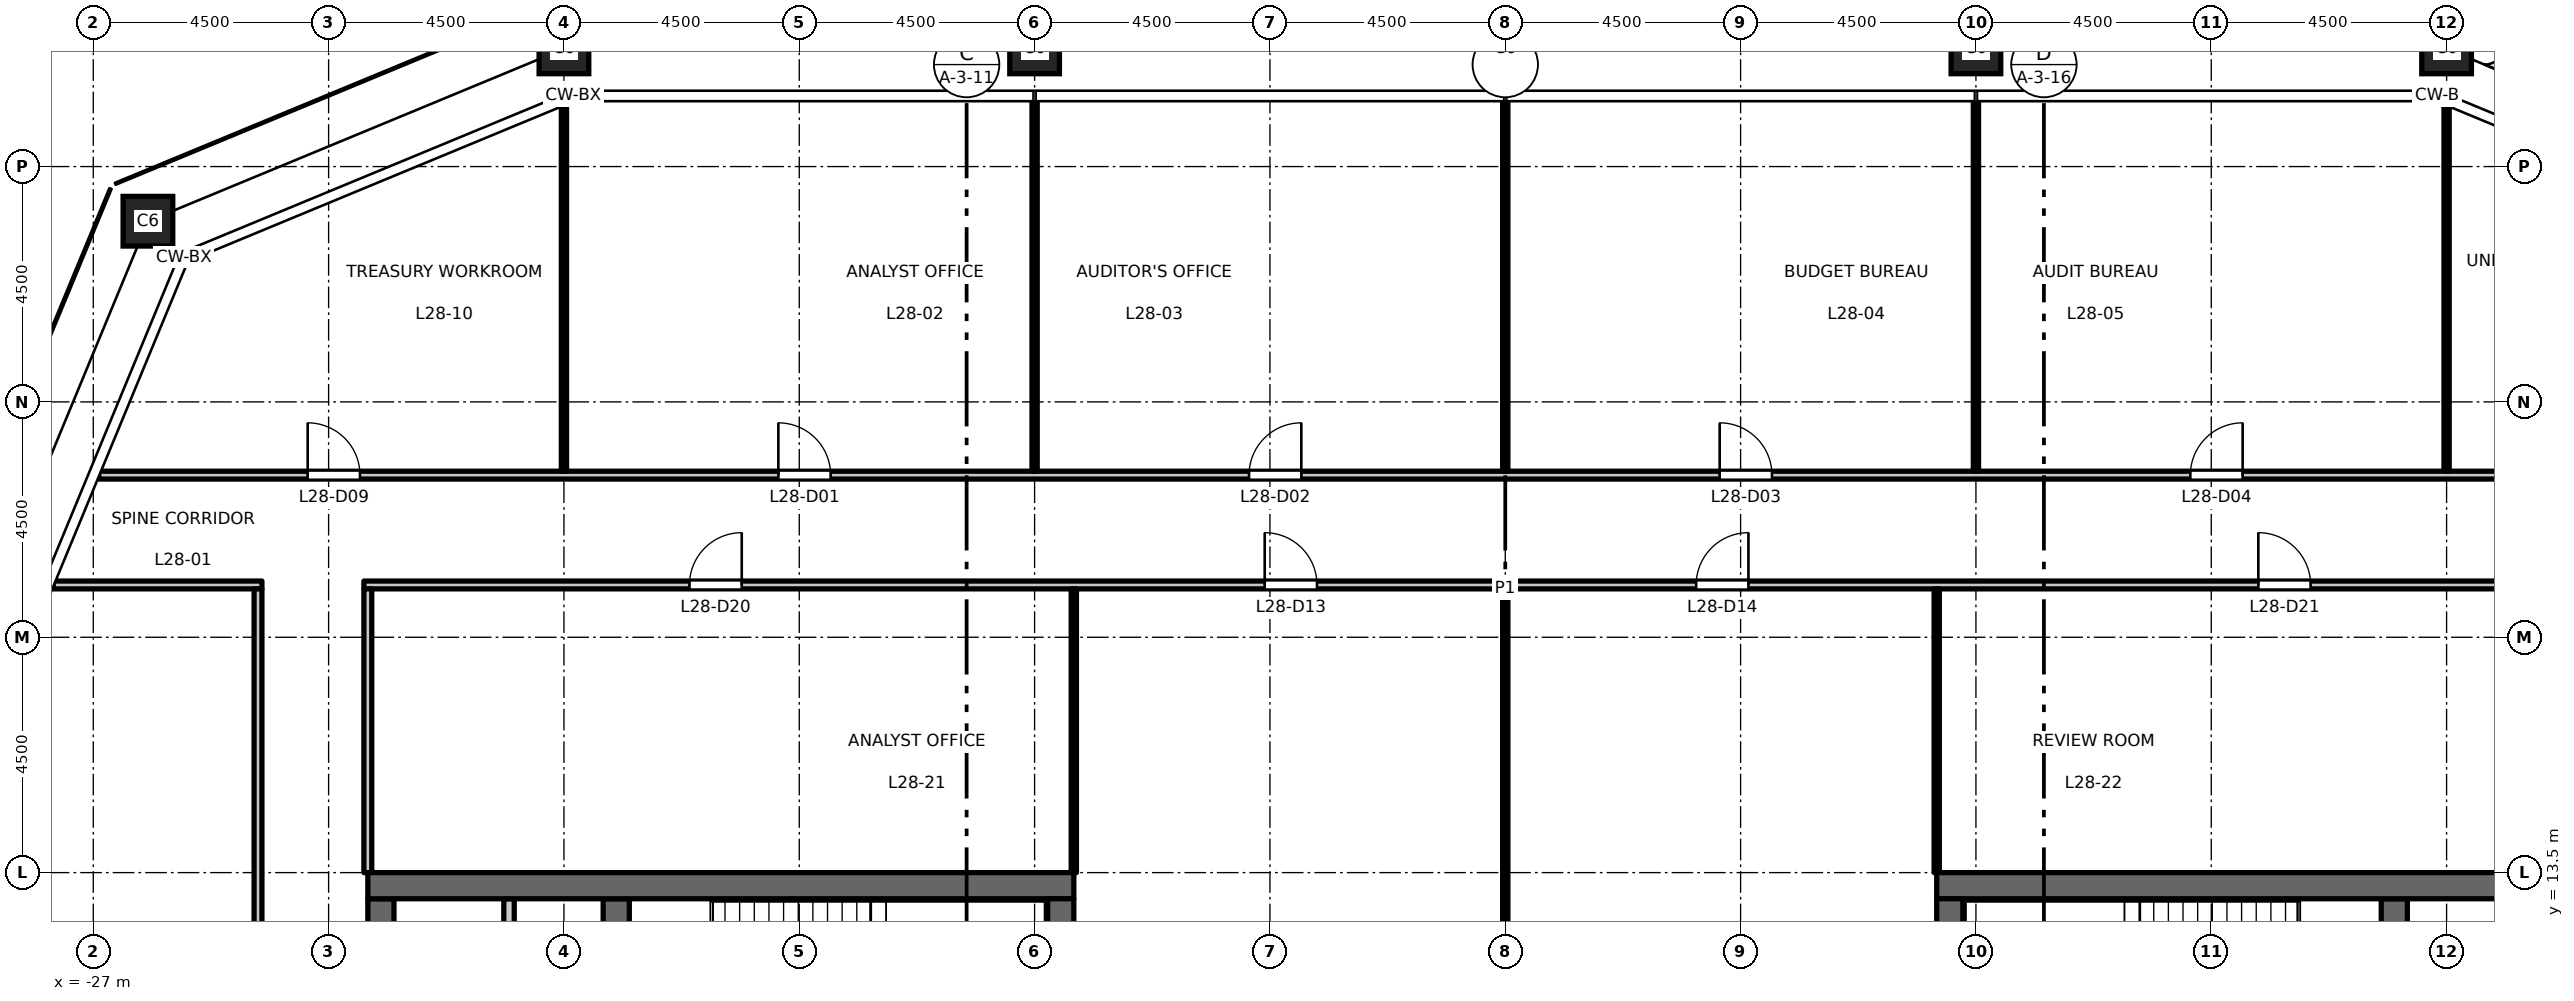
"""IFC4 building model, lengths in metres.
Left out: names, types, materials, properties, quantities, classifications, styles, units other than length and angle.
Written with IfcOpenShell. Run it as: python <this file> out.ifc"""

import sys

from ifc_helpers import new_model, si_unit, direction, frame, frame_2d, origin, origin_2d, place, context, subcontext, project, spatial, rectangle, hollow_rectangle, extrude, element, fill, save


model = new_model("IFC4")
c1 = context("Model", 3, precision=1e-05, world=origin(), true_north=direction((0.0, 1.0)))
c2 = subcontext(c1, "Body", "Model", "MODEL_VIEW")
j1 = project(units=[si_unit("LENGTHUNIT", "METRE"), si_unit("PLANEANGLEUNIT", "RADIAN")], contexts=[c1])
p1 = place(None, origin())
s1 = spatial("IfcSite", under=j1, at=p1, CompositionType="ELEMENT")
p2 = place(p1, origin())
s2 = spatial("IfcBuilding", under=s1, at=p2, CompositionType="ELEMENT")
p3 = place(p2, frame((0.0, 0.0, 131.7)))
s3 = spatial("IfcBuildingStorey", under=s2, at=p3, CompositionType="ELEMENT", Elevation=131.7)
for number, where, z_axis, x_axis in (
    (1, (18.0, 29.25, 0.0), (0.0, 0.0, 1.0), (1.0, 0.0, 0.0)),
    (2, (9.0, 29.25, 0.0), (0.0, 0.0, 1.0), (1.0, 0.0, 0.0)),
    (3, (0.0, 29.25, 0.0), (0.0, 0.0, 1.0), (1.0, 0.0, 0.0)),
    (4, (-9.0, 29.25, 0.0), (0.0, 0.0, 1.0), (1.0, 0.0, 0.0)),
    (5, (-18.0, 29.25, 0.0), (0.0, 0.0, 1.0), (1.0, 0.0, 0.0)),
    (6, (-25.955, 25.955, 0.0), (0.0, 0.0, 1.0), (1.0, 0.0, 0.0)),
):
    element("IfcColumn", number, at=place(p3, frame(where, z_axis=z_axis, x_axis=x_axis)), inside=s3, PredefinedType="COLUMN", context=c2, shape_type="SweptSolid", body=[
        extrude(hollow_rectangle(XDim=0.95, YDim=0.95, WallThickness=0.055, at=origin_2d()), origin(), (0.0, 0.0, 1.0), 4.5),
    ])
p4 = place(p3, frame((-21.5, -13.0, 0.0), z_axis=(0.0, 0.0, 1.0), x_axis=(0.0, 1.0, 0.0)))
e7 = element("IfcWall", 7, at=p4, inside=s3, PredefinedType="SHEAR", context=c2, shape_type="SweptSolid", body=[
    extrude(rectangle(XDim=26.0, YDim=0.5, at=frame_2d((13.0, 0.0))), origin(), (0.0, 0.0, 1.0), 4.35),
])
p5 = place(p4, frame((16.825, 0.0, 0.0)))
e8 = element("IfcOpeningElement", 8, at=p5, cuts=e7, PredefinedType="OPENING", context=c2, shape_type="SweptSolid", body=[
    extrude(rectangle(XDim=1.8, YDim=2.1, at=frame_2d((0.9, 1.05))), frame((0.0, 0.26, 0.0), z_axis=(0.0, -1.0, 0.0), x_axis=(1.0, 0.0, 0.0)), (0.0, 0.0, 1.0), 0.52),
])
p6 = place(p4, frame((7.375, 0.0, 0.0)))
e9 = element("IfcOpeningElement", 9, at=p6, cuts=e7, PredefinedType="OPENING", context=c2, shape_type="SweptSolid", body=[
    extrude(rectangle(XDim=1.8, YDim=2.1, at=frame_2d((0.9, 1.05))), frame((0.0, 0.26, 0.0), z_axis=(0.0, -1.0, 0.0), x_axis=(1.0, 0.0, 0.0)), (0.0, 0.0, 1.0), 0.52),
])
p7 = place(p3, frame((-19.05, 6.425, 0.0), z_axis=(0.0, 0.0, 1.0), x_axis=(0.0, 1.0, 0.0)))
e10 = element("IfcWall", 10, at=p7, inside=s3, PredefinedType="PARTITIONING", context=c2, shape_type="SweptSolid", body=[
    extrude(rectangle(XDim=6.575, YDim=0.2, at=frame_2d((3.288, 0.0))), origin(), (0.0, 0.0, 1.0), 4.35),
])
p8 = place(p3, frame((-17.0, 6.425, 0.0), z_axis=(0.0, 0.0, 1.0), x_axis=(0.0, 1.0, 0.0)))
e11 = element("IfcWall", 11, at=p8, inside=s3, PredefinedType="SHEAR", context=c2, shape_type="SweptSolid", body=[
    extrude(rectangle(XDim=6.575, YDim=0.5, at=frame_2d((3.288, 0.0))), origin(), (0.0, 0.0, 1.0), 4.35),
])
p9 = place(p3, frame((-8.25, 13.25, 0.0), z_axis=(0.0, 0.0, 1.0), x_axis=(-1.0, 0.0, 0.0)))
e12 = element("IfcWall", 12, at=p9, inside=s3, PredefinedType="SHEAR", context=c2, shape_type="SweptSolid", body=[
    extrude(rectangle(XDim=13.5, YDim=0.5, at=frame_2d((6.75, 0.0))), origin(), (0.0, 0.0, 1.0), 4.35),
])
p10 = place(p3, frame((-8.5, -13.0, 0.0), z_axis=(0.0, 0.0, 1.0), x_axis=(0.0, 1.0, 0.0)))
e13 = element("IfcWall", 13, at=p10, inside=s3, PredefinedType="SHEAR", context=c2, shape_type="SweptSolid", body=[
    extrude(rectangle(XDim=26.0, YDim=0.5, at=frame_2d((13.0, 0.0))), origin(), (0.0, 0.0, 1.0), 4.35),
])
p11 = place(p3, frame((17.0, 6.425, 0.0), z_axis=(0.0, 0.0, 1.0), x_axis=(0.0, 1.0, 0.0)))
e14 = element("IfcWall", 14, at=p11, inside=s3, PredefinedType="SHEAR", context=c2, shape_type="SweptSolid", body=[
    extrude(rectangle(XDim=6.575, YDim=0.5, at=frame_2d((3.288, 0.0))), origin(), (0.0, 0.0, 1.0), 4.35),
])
p12 = place(p3, frame((8.25, 13.25, 0.0), z_axis=(0.0, 0.0, 1.0), x_axis=(1.0, 0.0, 0.0)))
e15 = element("IfcWall", 15, at=p12, inside=s3, PredefinedType="SHEAR", context=c2, shape_type="SweptSolid", body=[
    extrude(rectangle(XDim=13.5, YDim=0.5, at=frame_2d((6.75, 0.0))), origin(), (0.0, 0.0, 1.0), 4.35),
])
p13 = place(p3, frame((8.5, -13.0, 0.0), z_axis=(0.0, 0.0, 1.0), x_axis=(0.0, 1.0, 0.0)))
e16 = element("IfcWall", 16, at=p13, inside=s3, PredefinedType="SHEAR", context=c2, shape_type="SweptSolid", body=[
    extrude(rectangle(XDim=26.0, YDim=0.5, at=frame_2d((13.0, 0.0))), origin(), (0.0, 0.0, 1.0), 4.35),
])
p14 = place(p3, frame((-27.764, 19.0, 0.0), z_axis=(0.0, 0.0, 1.0), x_axis=(1.0, 0.0, 0.0)))
e17 = element("IfcWall", 17, at=p14, inside=s3, PredefinedType="PARTITIONING", context=c2, shape_type="SweptSolid", body=[
    extrude(rectangle(XDim=3.989, YDim=0.15, at=frame_2d((1.995, 0.0))), origin(), (0.0, 0.0, 1.0), 4.35),
])
p15 = place(p3, frame((-21.825, 19.0, 0.0), z_axis=(0.0, 0.0, 1.0), x_axis=(1.0, 0.0, 0.0)))
e18 = element("IfcWall", 18, at=p15, inside=s3, PredefinedType="PARTITIONING", context=c2, shape_type="SweptSolid", body=[
    extrude(rectangle(XDim=43.65, YDim=0.15, at=frame_2d((21.825, 0.0))), origin(), (0.0, 0.0, 1.0), 4.35),
])
p16 = place(p15, frame((17.225, 0.0, 0.0)))
e19 = element("IfcOpeningElement", 19, at=p16, cuts=e18, PredefinedType="OPENING", context=c2, shape_type="SweptSolid", body=[
    extrude(rectangle(XDim=1.0, YDim=2.1, at=frame_2d((0.5, 1.05))), frame((0.0, 0.085, 0.0), z_axis=(0.0, -1.0, 0.0), x_axis=(1.0, 0.0, 0.0)), (0.0, 0.0, 1.0), 0.17),
])
p17 = place(p15, frame((25.475, 0.0, 0.0)))
e20 = element("IfcOpeningElement", 20, at=p17, cuts=e18, PredefinedType="OPENING", context=c2, shape_type="SweptSolid", body=[
    extrude(rectangle(XDim=1.0, YDim=2.1, at=frame_2d((0.5, 1.05))), frame((0.0, 0.085, 0.0), z_axis=(0.0, -1.0, 0.0), x_axis=(1.0, 0.0, 0.0)), (0.0, 0.0, 1.0), 0.17),
])
p18 = place(p15, frame((6.225, 0.0, 0.0)))
e21 = element("IfcOpeningElement", 21, at=p18, cuts=e18, PredefinedType="OPENING", context=c2, shape_type="SweptSolid", body=[
    extrude(rectangle(XDim=1.0, YDim=2.1, at=frame_2d((0.5, 1.05))), frame((0.0, 0.085, 0.0), z_axis=(0.0, -1.0, 0.0), x_axis=(1.0, 0.0, 0.0)), (0.0, 0.0, 1.0), 0.17),
])
p19 = place(p15, frame((36.225, 0.0, 0.0)))
e22 = element("IfcOpeningElement", 22, at=p19, cuts=e18, PredefinedType="OPENING", context=c2, shape_type="SweptSolid", body=[
    extrude(rectangle(XDim=1.0, YDim=2.1, at=frame_2d((0.5, 1.05))), frame((0.0, 0.085, 0.0), z_axis=(0.0, -1.0, 0.0), x_axis=(1.0, 0.0, 0.0)), (0.0, 0.0, 1.0), 0.17),
])
p20 = place(p3, frame((-26.894, 21.1, 0.0), z_axis=(0.0, 0.0, 1.0), x_axis=(1.0, 0.0, 0.0)))
e23 = element("IfcWall", 23, at=p20, inside=s3, PredefinedType="PARTITIONING", context=c2, shape_type="SweptSolid", body=[
    extrude(rectangle(XDim=53.788, YDim=0.15, at=frame_2d((26.894, 0.0))), origin(), (0.0, 0.0, 1.0), 4.35),
])
p21 = place(p20, frame((12.994, 0.0, 0.0)))
e24 = element("IfcOpeningElement", 24, at=p21, cuts=e23, PredefinedType="OPENING", context=c2, shape_type="SweptSolid", body=[
    extrude(rectangle(XDim=1.0, YDim=2.1, at=frame_2d((0.5, 1.05))), frame((0.0, 0.085, 0.0), z_axis=(0.0, -1.0, 0.0), x_axis=(1.0, 0.0, 0.0)), (0.0, 0.0, 1.0), 0.17),
])
p22 = place(p20, frame((21.994, 0.0, 0.0)))
e25 = element("IfcOpeningElement", 25, at=p22, cuts=e23, PredefinedType="OPENING", context=c2, shape_type="SweptSolid", body=[
    extrude(rectangle(XDim=1.0, YDim=2.1, at=frame_2d((0.5, 1.05))), frame((0.0, 0.085, 0.0), z_axis=(0.0, -1.0, 0.0), x_axis=(1.0, 0.0, 0.0)), (0.0, 0.0, 1.0), 0.17),
])
p23 = place(p20, frame((30.994, 0.0, 0.0)))
e26 = element("IfcOpeningElement", 26, at=p23, cuts=e23, PredefinedType="OPENING", context=c2, shape_type="SweptSolid", body=[
    extrude(rectangle(XDim=1.0, YDim=2.1, at=frame_2d((0.5, 1.05))), frame((0.0, 0.085, 0.0), z_axis=(0.0, -1.0, 0.0), x_axis=(1.0, 0.0, 0.0)), (0.0, 0.0, 1.0), 0.17),
])
p24 = place(p20, frame((39.994, 0.0, 0.0)))
e27 = element("IfcOpeningElement", 27, at=p24, cuts=e23, PredefinedType="OPENING", context=c2, shape_type="SweptSolid", body=[
    extrude(rectangle(XDim=1.0, YDim=2.1, at=frame_2d((0.5, 1.05))), frame((0.0, 0.085, 0.0), z_axis=(0.0, -1.0, 0.0), x_axis=(1.0, 0.0, 0.0)), (0.0, 0.0, 1.0), 0.17),
])
p25 = place(p20, frame((3.994, 0.0, 0.0)))
e28 = element("IfcOpeningElement", 28, at=p25, cuts=e23, PredefinedType="OPENING", context=c2, shape_type="SweptSolid", body=[
    extrude(rectangle(XDim=1.0, YDim=2.1, at=frame_2d((0.5, 1.05))), frame((0.0, 0.085, 0.0), z_axis=(0.0, -1.0, 0.0), x_axis=(1.0, 0.0, 0.0)), (0.0, 0.0, 1.0), 0.17),
])
p26 = place(p20, frame((48.888, 0.0, 0.0)))
e29 = element("IfcOpeningElement", 29, at=p26, cuts=e23, PredefinedType="OPENING", context=c2, shape_type="SweptSolid", body=[
    extrude(rectangle(XDim=1.0, YDim=2.1, at=frame_2d((0.5, 1.05))), frame((0.0, 0.085, 0.0), z_axis=(0.0, -1.0, 0.0), x_axis=(1.0, 0.0, 0.0)), (0.0, 0.0, 1.0), 0.17),
])
p27 = place(p3, frame((-23.85, -18.925, 0.0), z_axis=(0.0, 0.0, 1.0), x_axis=(0.0, 1.0, 0.0)))
e30 = element("IfcWall", 30, at=p27, inside=s3, PredefinedType="PARTITIONING", context=c2, shape_type="SweptSolid", body=[
    extrude(rectangle(XDim=37.85, YDim=0.15, at=frame_2d((18.925, 0.0))), origin(), (0.0, 0.0, 1.0), 4.35),
])
p28 = place(p27, frame((18.525, 0.0, 0.0)))
e31 = element("IfcOpeningElement", 31, at=p28, cuts=e30, PredefinedType="OPENING", context=c2, shape_type="SweptSolid", body=[
    extrude(rectangle(XDim=1.0, YDim=2.1, at=frame_2d((0.5, 1.05))), frame((0.0, 0.085, 0.0), z_axis=(0.0, -1.0, 0.0), x_axis=(1.0, 0.0, 0.0)), (0.0, 0.0, 1.0), 0.17),
])
p29 = place(p3, frame((-21.75, 13.5, 0.0), z_axis=(0.0, 0.0, 1.0), x_axis=(0.0, 1.0, 0.0)))
e32 = element("IfcWall", 32, at=p29, inside=s3, PredefinedType="PARTITIONING", context=c2, shape_type="SweptSolid", body=[
    extrude(rectangle(XDim=5.425, YDim=0.15, at=frame_2d((2.712, 0.0))), origin(), (0.0, 0.0, 1.0), 4.35),
])
p30 = place(p3, frame((-18.0, 21.175, 0.0), z_axis=(0.0, 0.0, 1.0), x_axis=(0.0, 1.0, 0.0)))
e33 = element("IfcWall", 33, at=p30, inside=s3, PredefinedType="PARTITIONING", context=c2, shape_type="SweptSolid", body=[
    extrude(rectangle(XDim=7.003, YDim=0.1, at=frame_2d((3.501, 0.0))), origin(), (0.0, 0.0, 1.0), 3.45),
])
p31 = place(p3, frame((-9.0, 21.175, 0.0), z_axis=(0.0, 0.0, 1.0), x_axis=(0.0, 1.0, 0.0)))
e34 = element("IfcWall", 34, at=p31, inside=s3, PredefinedType="PARTITIONING", context=c2, shape_type="SweptSolid", body=[
    extrude(rectangle(XDim=7.085, YDim=0.1, at=frame_2d((3.542, 0.0))), origin(), (0.0, 0.0, 1.0), 3.45),
])
p32 = place(p3, frame((-8.25, 13.5, 0.0), z_axis=(0.0, 0.0, 1.0), x_axis=(0.0, 1.0, 0.0)))
e35 = element("IfcWall", 35, at=p32, inside=s3, PredefinedType="PARTITIONING", context=c2, shape_type="SweptSolid", body=[
    extrude(rectangle(XDim=5.425, YDim=0.1, at=frame_2d((2.712, 0.0))), origin(), (0.0, 0.0, 1.0), 4.35),
])
p33 = place(p3, frame((0.0, 8.65, 0.0), z_axis=(0.0, 0.0, 1.0), x_axis=(0.0, 1.0, 0.0)))
e36 = element("IfcWall", 36, at=p33, inside=s3, PredefinedType="PARTITIONING", context=c2, shape_type="SweptSolid", body=[
    extrude(rectangle(XDim=10.275, YDim=0.1, at=frame_2d((5.138, 0.0))), origin(), (0.0, 0.0, 1.0), 3.45),
])
p34 = place(p3, frame((0.0, 21.175, 0.0), z_axis=(0.0, 0.0, 1.0), x_axis=(0.0, 1.0, 0.0)))
e37 = element("IfcWall", 37, at=p34, inside=s3, PredefinedType="PARTITIONING", context=c2, shape_type="SweptSolid", body=[
    extrude(rectangle(XDim=7.085, YDim=0.1, at=frame_2d((3.542, 0.0))), origin(), (0.0, 0.0, 1.0), 3.45),
])
p35 = place(p3, frame((8.25, 13.5, 0.0), z_axis=(0.0, 0.0, 1.0), x_axis=(0.0, 1.0, 0.0)))
e38 = element("IfcWall", 38, at=p35, inside=s3, PredefinedType="PARTITIONING", context=c2, shape_type="SweptSolid", body=[
    extrude(rectangle(XDim=5.425, YDim=0.1, at=frame_2d((2.712, 0.0))), origin(), (0.0, 0.0, 1.0), 4.35),
])
p36 = place(p3, frame((9.0, 21.175, 0.0), z_axis=(0.0, 0.0, 1.0), x_axis=(0.0, 1.0, 0.0)))
e39 = element("IfcWall", 39, at=p36, inside=s3, PredefinedType="PARTITIONING", context=c2, shape_type="SweptSolid", body=[
    extrude(rectangle(XDim=7.085, YDim=0.1, at=frame_2d((3.542, 0.0))), origin(), (0.0, 0.0, 1.0), 3.45),
])
p37 = place(p3, frame((18.0, 21.175, 0.0), z_axis=(0.0, 0.0, 1.0), x_axis=(0.0, 1.0, 0.0)))
e40 = element("IfcWall", 40, at=p37, inside=s3, PredefinedType="PARTITIONING", context=c2, shape_type="SweptSolid", body=[
    extrude(rectangle(XDim=7.003, YDim=0.1, at=frame_2d((3.501, 0.0))), origin(), (0.0, 0.0, 1.0), 3.45),
])
p38 = place(p21, origin())
e41 = element("IfcDoor", 41, at=p38, inside=s3, OperationType="SINGLE_SWING_LEFT", PredefinedType="DOOR", context=c2, shape_type="SweptSolid", body=[
    extrude(rectangle(XDim=1.0, YDim=2.1, at=frame_2d((0.5, 1.05))), frame((0.0, 0.025, 0.0), z_axis=(0.0, -1.0, 0.0), x_axis=(1.0, 0.0, 0.0)), (0.0, 0.0, 1.0), 0.05),
])
fill(e24, e41)
p39 = place(p22, origin())
e42 = element("IfcDoor", 42, at=p39, inside=s3, OperationType="SINGLE_SWING_RIGHT", PredefinedType="DOOR", context=c2, shape_type="SweptSolid", body=[
    extrude(rectangle(XDim=1.0, YDim=2.1, at=frame_2d((0.5, 1.05))), frame((0.0, 0.025, 0.0), z_axis=(0.0, -1.0, 0.0), x_axis=(1.0, 0.0, 0.0)), (0.0, 0.0, 1.0), 0.05),
])
fill(e25, e42)
p40 = place(p23, origin())
e43 = element("IfcDoor", 43, at=p40, inside=s3, OperationType="SINGLE_SWING_LEFT", PredefinedType="DOOR", context=c2, shape_type="SweptSolid", body=[
    extrude(rectangle(XDim=1.0, YDim=2.1, at=frame_2d((0.5, 1.05))), frame((0.0, 0.025, 0.0), z_axis=(0.0, -1.0, 0.0), x_axis=(1.0, 0.0, 0.0)), (0.0, 0.0, 1.0), 0.05),
])
fill(e26, e43)
p41 = place(p24, origin())
e44 = element("IfcDoor", 44, at=p41, inside=s3, OperationType="SINGLE_SWING_RIGHT", PredefinedType="DOOR", context=c2, shape_type="SweptSolid", body=[
    extrude(rectangle(XDim=1.0, YDim=2.1, at=frame_2d((0.5, 1.05))), frame((0.0, 0.025, 0.0), z_axis=(0.0, -1.0, 0.0), x_axis=(1.0, 0.0, 0.0)), (0.0, 0.0, 1.0), 0.05),
])
fill(e27, e44)
p42 = place(p25, origin())
e45 = element("IfcDoor", 45, at=p42, inside=s3, OperationType="SINGLE_SWING_LEFT", PredefinedType="DOOR", context=c2, shape_type="SweptSolid", body=[
    extrude(rectangle(XDim=1.0, YDim=2.1, at=frame_2d((0.5, 1.05))), frame((0.0, 0.025, 0.0), z_axis=(0.0, -1.0, 0.0), x_axis=(1.0, 0.0, 0.0)), (0.0, 0.0, 1.0), 0.05),
])
fill(e28, e45)
p43 = place(p16, origin())
e46 = element("IfcDoor", 46, at=p43, inside=s3, OperationType="SINGLE_SWING_LEFT", PredefinedType="DOOR", context=c2, shape_type="SweptSolid", body=[
    extrude(rectangle(XDim=1.0, YDim=2.1, at=frame_2d((0.5, 1.05))), frame((0.0, 0.025, 0.0), z_axis=(0.0, -1.0, 0.0), x_axis=(1.0, 0.0, 0.0)), (0.0, 0.0, 1.0), 0.05),
])
fill(e19, e46)
p44 = place(p17, origin())
e47 = element("IfcDoor", 47, at=p44, inside=s3, OperationType="SINGLE_SWING_RIGHT", PredefinedType="DOOR", context=c2, shape_type="SweptSolid", body=[
    extrude(rectangle(XDim=1.0, YDim=2.1, at=frame_2d((0.5, 1.05))), frame((0.0, 0.025, 0.0), z_axis=(0.0, -1.0, 0.0), x_axis=(1.0, 0.0, 0.0)), (0.0, 0.0, 1.0), 0.05),
])
fill(e20, e47)
p45 = place(p18, origin())
e48 = element("IfcDoor", 48, at=p45, inside=s3, OperationType="SINGLE_SWING_RIGHT", PredefinedType="DOOR", context=c2, shape_type="SweptSolid", body=[
    extrude(rectangle(XDim=1.0, YDim=2.1, at=frame_2d((0.5, 1.05))), frame((0.0, 0.025, 0.0), z_axis=(0.0, -1.0, 0.0), x_axis=(1.0, 0.0, 0.0)), (0.0, 0.0, 1.0), 0.05),
])
fill(e21, e48)
p46 = place(p19, origin())
e49 = element("IfcDoor", 49, at=p46, inside=s3, OperationType="SINGLE_SWING_LEFT", PredefinedType="DOOR", context=c2, shape_type="SweptSolid", body=[
    extrude(rectangle(XDim=1.0, YDim=2.1, at=frame_2d((0.5, 1.05))), frame((0.0, 0.025, 0.0), z_axis=(0.0, -1.0, 0.0), x_axis=(1.0, 0.0, 0.0)), (0.0, 0.0, 1.0), 0.05),
])
fill(e22, e49)
save(model, sys.argv[1])
